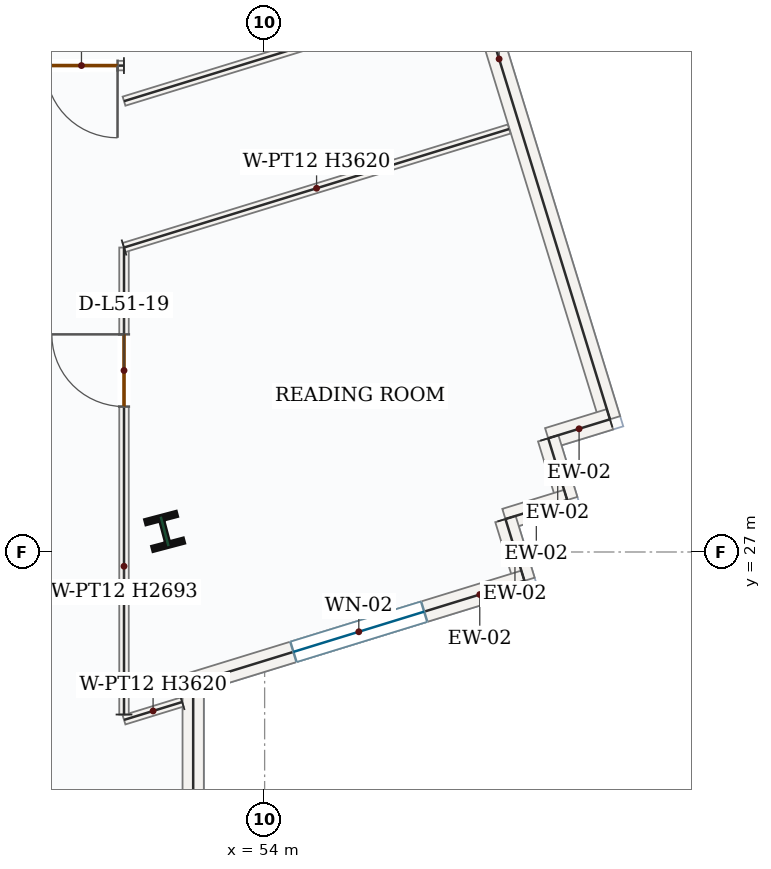
"""IFC4 building model, lengths in metres.
Left out: names, types, materials, properties, quantities, classifications, styles, units other than length and angle.
Written with IfcOpenShell. Run it as: python <this file> out.ifc"""

import sys

from ifc_helpers import new_model, si_unit, direction, frame, frame_2d, origin, origin_2d, place, context, subcontext, project, spatial, rectangle, i_section, extrude, source, transform, mapped, element, fill, save


model = new_model("IFC4")
c1 = context("Model", 3, precision=1e-05, world=origin(), true_north=direction((0.0, 1.0)))
c2 = subcontext(c1, "Body", "Model", "MODEL_VIEW")
j1 = project(units=[si_unit("LENGTHUNIT", "METRE"), si_unit("PLANEANGLEUNIT", "RADIAN")], contexts=[c1])
p1 = place(None, origin())
s1 = spatial("IfcSite", under=j1, at=p1, CompositionType="ELEMENT")
p2 = place(p1, origin())
s2 = spatial("IfcBuilding", under=s1, at=p2, CompositionType="ELEMENT")
p3 = place(p2, frame((0.0, 0.0, 217.5)))
s3 = spatial("IfcBuildingStorey", under=s2, at=p3, CompositionType="ELEMENT", Elevation=217.5)
m1 = source(origin(), c2, "Body", "SweptSolid", [
    extrude(i_section(OverallWidth=0.404, OverallDepth=0.407, WebThickness=0.027, FlangeThickness=0.044, FilletRadius=0.018, at=origin_2d()), origin(), (0.0, 0.0, 1.0), 3.9),
])
p4 = place(p3, frame((52.684, 27.271, 0.0), z_axis=(0.0, 0.0, 1.0), x_axis=(0.966823388604, 0.255445757936, 0.0)))
e1 = element("IfcColumn", 1, at=p4, inside=s3, PredefinedType="COLUMN", context=c2, shape_type="MappedRepresentation", body=[
    mapped(m1, transform((0.0, 0.0, 0.0), x_axis=(1.0, 0.0, 0.0), y_axis=(0.0, 1.0, 0.0), z_axis=(0.0, 0.0, 1.0), scale=1.0)),
])
m2 = source(origin(), c2, "Body", "SweptSolid", [
    extrude(rectangle(XDim=9.92, YDim=0.28, at=frame_2d((4.96, 0.0))), origin(), (0.0, 0.0, 1.0), 3.62),
])
p5 = place(p3, frame((55.626, 38.227, 0.0), z_axis=(0.0, 0.0, 1.0), x_axis=(0.294028777175, -0.955796567368, 0.0)))
e2 = element("IfcWall", 2, at=p5, inside=s3, PredefinedType="SOLIDWALL", context=c2, shape_type="MappedRepresentation", body=[
    mapped(m2, transform((0.0, 0.0, 0.0), x_axis=(1.0, 0.0, 0.0), y_axis=(0.0, 1.0, 0.0), z_axis=(0.0, 0.0, 1.0), scale=1.0)),
])
m3 = source(origin(), c2, "Body", "SweptSolid", [
    extrude(rectangle(XDim=0.85, YDim=0.28, at=frame_2d((0.425, 0.0))), origin(), (0.0, 0.0, 1.0), 3.62),
])
p6 = place(p3, frame((58.543, 28.746, 0.0), z_axis=(0.0, 0.0, 1.0), x_axis=(-0.955779008722, -0.294085848838, 0.0)))
e3 = element("IfcWall", 3, at=p6, inside=s3, PredefinedType="SOLIDWALL", context=c2, shape_type="MappedRepresentation", body=[
    mapped(m3, transform((0.0, 0.0, 0.0), x_axis=(1.0, 0.0, 0.0), y_axis=(0.0, 1.0, 0.0), z_axis=(0.0, 0.0, 1.0), scale=1.0)),
])
m4 = source(origin(), c2, "Body", "SweptSolid", [
    extrude(rectangle(XDim=0.85, YDim=0.28, at=frame_2d((0.425, 0.0))), origin(), (0.0, 0.0, 1.0), 3.62),
])
p7 = place(p3, frame((57.731, 28.496, 0.0), z_axis=(0.0, 0.0, 1.0), x_axis=(0.294166594531, -0.95575416016, 0.0)))
e4 = element("IfcWall", 4, at=p7, inside=s3, PredefinedType="SOLIDWALL", context=c2, shape_type="MappedRepresentation", body=[
    mapped(m4, transform((0.0, 0.0, 0.0), x_axis=(1.0, 0.0, 0.0), y_axis=(0.0, 1.0, 0.0), z_axis=(0.0, 0.0, 1.0), scale=1.0)),
])
for number, where, z_axis, x_axis in (
    (5, (57.981, 27.684, 0.0), (0.0, 0.0, 1.0), (-0.956, -0.294, 0.0)),
    (6, (57.168, 27.434, 0.0), (0.0, 0.0, 1.0), (0.294, -0.956, 0.0)),
):
    element("IfcWall", number, at=place(p3, frame(where, z_axis=z_axis, x_axis=x_axis)), inside=s3, PredefinedType="SOLIDWALL", context=c2, shape_type="MappedRepresentation", body=[
        mapped(m3, transform((0.0, 0.0, 0.0), x_axis=(1.0, 0.0, 0.0), y_axis=(0.0, 1.0, 0.0), z_axis=(0.0, 0.0, 1.0), scale=1.0)),
    ])
p8 = place(p3, frame((57.418, 26.621, 0.0), z_axis=(0.0, 0.0, 1.0), x_axis=(-0.955788269664, -0.294055749089, 0.0)))
e7 = element("IfcWall", 7, at=p8, inside=s3, PredefinedType="SOLIDWALL", context=c2, shape_type="SweptSolid", body=[
    extrude(rectangle(XDim=4.56, YDim=0.28, at=frame_2d((2.28, 0.0))), origin(), (0.0, 0.0, 1.0), 3.62),
])
p9 = place(p8, frame((1.38, 0.0, 0.85)))
e8 = element("IfcOpeningElement", 8, at=p9, cuts=e7, PredefinedType="OPENING", context=c2, shape_type="SweptSolid", body=[
    extrude(rectangle(XDim=1.8, YDim=1.75, at=frame_2d((0.9, 0.875))), frame((0.0, 0.15, 0.0), z_axis=(0.0, -1.0, 0.0), x_axis=(1.0, 0.0, 0.0)), (0.0, 0.0, 1.0), 0.3),
])
m5 = source(origin(), c2, "Body", "SweptSolid", [
    extrude(rectangle(XDim=6.822, YDim=0.28, at=frame_2d((3.411, 0.0))), origin(), (0.0, 0.0, 1.0), 3.62),
])
p10 = place(p3, frame((53.06, 25.28, 0.0), z_axis=(0.0, 0.0, 1.0), x_axis=(0.0, -1.0, 0.0)))
e9 = element("IfcWall", 9, at=p10, inside=s3, PredefinedType="SOLIDWALL", context=c2, shape_type="MappedRepresentation", body=[
    mapped(m5, transform((0.0, 0.0, 0.0), x_axis=(1.0, 0.0, 0.0), y_axis=(0.0, 1.0, 0.0), z_axis=(0.0, 0.0, 1.0), scale=1.0)),
])
m6 = source(origin(), c2, "Body", "SweptSolid", [
    extrude(rectangle(XDim=0.801, YDim=0.125, at=frame_2d((0.4, 0.0))), origin(), (0.0, 0.0, 1.0), 3.62),
])
p11 = place(p3, frame((52.915, 25.026, 0.0), z_axis=(0.0, 0.0, 1.0), x_axis=(-0.955805381473, -0.29400012372, 0.0)))
e10 = element("IfcWall", 10, at=p11, inside=s3, PredefinedType="PARTITIONING", context=c2, shape_type="MappedRepresentation", body=[
    mapped(m6, transform((0.0, 0.0, 0.0), x_axis=(1.0, 0.0, 0.0), y_axis=(0.0, 1.0, 0.0), z_axis=(0.0, 0.0, 1.0), scale=1.0)),
])
p12 = place(p3, frame((52.15, 24.862, 0.0), z_axis=(0.0, 0.0, 1.0), x_axis=(0.0, 1.0, 0.0)))
e11 = element("IfcWall", 11, at=p12, inside=s3, PredefinedType="PARTITIONING", context=c2, shape_type="SweptSolid", body=[
    extrude(rectangle(XDim=6.144, YDim=0.125, at=frame_2d((3.072, 0.0))), origin(), (0.0, 0.0, 1.0), 2.693),
])
p13 = place(p12, frame((4.052, 0.0, 0.0)))
e12 = element("IfcOpeningElement", 12, at=p13, cuts=e11, PredefinedType="OPENING", context=c2, shape_type="SweptSolid", body=[
    extrude(rectangle(XDim=0.95, YDim=2.15, at=frame_2d((0.475, 1.075))), frame((0.0, 0.073, 0.0), z_axis=(0.0, -1.0, 0.0), x_axis=(1.0, 0.0, 0.0)), (0.0, 0.0, 1.0), 0.145),
])
m7 = source(origin(), c2, "Body", "SweptSolid", [
    extrude(rectangle(XDim=5.301, YDim=0.125, at=frame_2d((2.651, 0.0))), origin(), (0.0, 0.0, 1.0), 3.62),
])
p14 = place(p3, frame((52.15, 31.006, 0.0), z_axis=(0.0, 0.0, 1.0), x_axis=(0.955789961274, 0.294050250686, 0.0)))
e13 = element("IfcWall", 13, at=p14, inside=s3, PredefinedType="PARTITIONING", context=c2, shape_type="MappedRepresentation", body=[
    mapped(m7, transform((0.0, 0.0, 0.0), x_axis=(1.0, 0.0, 0.0), y_axis=(0.0, 1.0, 0.0), z_axis=(0.0, 0.0, 1.0), scale=1.0)),
])
m8 = source(origin(), c2, "Body", "SweptSolid", [
    extrude(rectangle(XDim=4.735, YDim=0.125, at=frame_2d((2.368, 0.0))), origin(), (0.0, 0.0, 1.0), 3.62),
])
p15 = place(p3, frame((56.676, 34.323, 0.0), z_axis=(0.0, 0.0, 1.0), x_axis=(-0.955793499711, -0.294038748994, 0.0)))
e14 = element("IfcWall", 14, at=p15, inside=s3, PredefinedType="PARTITIONING", context=c2, shape_type="MappedRepresentation", body=[
    mapped(m8, transform((0.0, 0.0, 0.0), x_axis=(1.0, 0.0, 0.0), y_axis=(0.0, 1.0, 0.0), z_axis=(0.0, 0.0, 1.0), scale=1.0)),
])
p16 = place(p3, frame((52.149, 33.399, 0.0), z_axis=(0.0, 0.0, 1.0), x_axis=(-0.999999754632, 0.000700525222, 0.0)))
e15 = element("IfcWall", 15, at=p16, inside=s3, PredefinedType="PARTITIONING", context=c2, shape_type="SweptSolid", body=[
    extrude(rectangle(XDim=1.394, YDim=0.125, at=frame_2d((0.697, 0.0))), origin(), (0.0, 0.0, 1.0), 3.62),
])
p17 = place(p16, frame((0.084, 0.0, 0.0)))
e16 = element("IfcOpeningElement", 16, at=p17, cuts=e15, PredefinedType="OPENING", context=c2, shape_type="SweptSolid", body=[
    extrude(rectangle(XDim=0.95, YDim=2.15, at=frame_2d((0.475, 1.075))), frame((0.0, 0.073, 0.0), z_axis=(0.0, -1.0, 0.0), x_axis=(1.0, 0.0, 0.0)), (0.0, 0.0, 1.0), 0.145),
])
m9 = source(origin(), c2, "Body", "SweptSolid", [
    extrude(rectangle(XDim=1.8, YDim=1.75, at=frame_2d((0.9, 0.875))), frame((0.0, 0.03, 0.0), z_axis=(0.0, -1.0, 0.0), x_axis=(1.0, 0.0, 0.0)), (0.0, 0.0, 1.0), 0.06),
])
p18 = place(p9, origin())
e17 = element("IfcWindow", 17, at=p18, inside=s3, PartitioningType="DOUBLE_PANEL_VERTICAL", PredefinedType="WINDOW", context=c2, shape_type="MappedRepresentation", body=[
    mapped(m9, transform((0.0, 0.0, 0.0), x_axis=(1.0, 0.0, 0.0), y_axis=(0.0, 1.0, 0.0), z_axis=(0.0, 0.0, 1.0), scale=1.0)),
])
fill(e8, e17)
m10 = source(origin(), c2, "Body", "SweptSolid", [
    extrude(rectangle(XDim=0.95, YDim=2.15, at=frame_2d((0.475, 1.075))), frame((0.0, 0.025, 0.0), z_axis=(0.0, -1.0, 0.0), x_axis=(1.0, 0.0, 0.0)), (0.0, 0.0, 1.0), 0.05),
])
p19 = place(p13, origin())
e18 = element("IfcDoor", 18, at=p19, inside=s3, OperationType="SINGLE_SWING_RIGHT", PredefinedType="DOOR", context=c2, shape_type="MappedRepresentation", body=[
    mapped(m10, transform((0.0, 0.0, 0.0), x_axis=(1.0, 0.0, 0.0), y_axis=(0.0, 1.0, 0.0), z_axis=(0.0, 0.0, 1.0), scale=1.0)),
])
fill(e12, e18)
p20 = place(p17, origin())
e19 = element("IfcDoor", 19, at=p20, inside=s3, OperationType="SINGLE_SWING_LEFT", PredefinedType="DOOR", context=c2, shape_type="MappedRepresentation", body=[
    mapped(m10, transform((0.0, 0.0, 0.0), x_axis=(1.0, 0.0, 0.0), y_axis=(0.0, 1.0, 0.0), z_axis=(0.0, 0.0, 1.0), scale=1.0)),
])
fill(e16, e19)
save(model, sys.argv[1])
